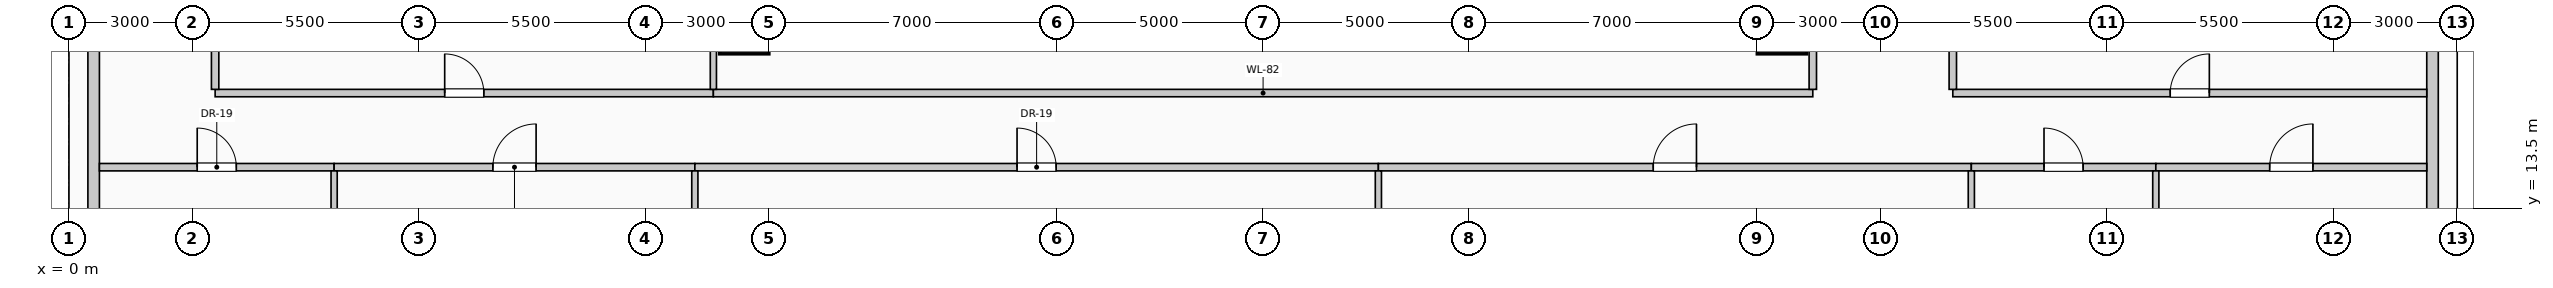
"""IFC4 building model, lengths in metres.
Left out: names, types, materials, properties, quantities, classifications, styles, units other than length and angle.
Written with IfcOpenShell. Run it as: python <this file> out.ifc"""

import sys

from ifc_helpers import new_model, si_unit, direction, frame, frame_2d, origin, origin_2d, place, context, subcontext, project, spatial, rectangle, extrude, element, fill, save


model = new_model("IFC4")
c1 = context("Model", 3, precision=1e-05, world=origin(), true_north=direction((0.0, 1.0)))
c2 = subcontext(c1, "Body", "Model", "MODEL_VIEW")
j1 = project(units=[si_unit("LENGTHUNIT", "METRE"), si_unit("PLANEANGLEUNIT", "RADIAN")], contexts=[c1])
p1 = place(None, origin())
s1 = spatial("IfcSite", under=j1, at=p1, CompositionType="ELEMENT")
p2 = place(p1, origin())
s2 = spatial("IfcBuilding", under=s1, at=p2, CompositionType="ELEMENT")
p3 = place(p2, frame((0.0, 0.0, 62.6)))
s3 = spatial("IfcBuildingStorey", under=s2, at=p3, CompositionType="ELEMENT", Elevation=62.6)
for number, where, z_axis, x_axis in (
    (1, (16.4, 18.0, 0.0), (0.0, 0.0, 1.0), (1.0, 0.0, 0.0)),
    (2, (41.6, 18.0, 0.0), (0.0, 0.0, 1.0), (1.0, 0.0, 0.0)),
):
    element("IfcColumn", number, at=place(p3, frame(where, z_axis=z_axis, x_axis=x_axis)), inside=s3, PredefinedType="COLUMN", context=c2, shape_type="SweptSolid", body=[
        extrude(rectangle(XDim=1.2, YDim=1.5, at=origin_2d()), origin(), (0.0, 0.0, 1.0), 4.0),
    ])
p4 = place(p3, frame((0.6, 10.47, 0.0), z_axis=(0.0, 0.0, 1.0), x_axis=(0.0, 1.0, 0.0)))
e3 = element("IfcWall", 3, at=p4, inside=s3, PredefinedType="SOLIDWALL", context=c2, shape_type="SweptSolid", body=[
    extrude(rectangle(XDim=7.06, YDim=0.28, at=frame_2d((3.53, 0.0))), origin(), (0.0, 0.0, 1.0), 2.85),
])
p5 = place(p4, frame((1.22, 0.0, 0.5)))
e4 = element("IfcOpeningElement", 4, at=p5, cuts=e3, PredefinedType="OPENING", context=c2, shape_type="SweptSolid", body=[
    extrude(rectangle(XDim=1.7, YDim=1.95, at=frame_2d((0.85, 0.975))), frame((0.0, 0.15, 0.0), z_axis=(0.0, -1.0, 0.0), x_axis=(1.0, 0.0, 0.0)), (0.0, 0.0, 1.0), 0.3),
])
p6 = place(p3, frame((57.4, 17.53, 0.0), z_axis=(0.0, 0.0, 1.0), x_axis=(0.0, -1.0, 0.0)))
e5 = element("IfcWall", 5, at=p6, inside=s3, PredefinedType="SOLIDWALL", context=c2, shape_type="SweptSolid", body=[
    extrude(rectangle(XDim=7.06, YDim=0.28, at=frame_2d((3.53, 0.0))), origin(), (0.0, 0.0, 1.0), 2.85),
])
p7 = place(p6, frame((4.14, 0.0, 0.5)))
e6 = element("IfcOpeningElement", 6, at=p7, cuts=e5, PredefinedType="OPENING", context=c2, shape_type="SweptSolid", body=[
    extrude(rectangle(XDim=1.7, YDim=1.95, at=frame_2d((0.85, 0.975))), frame((0.0, 0.15, 0.0), z_axis=(0.0, -1.0, 0.0), x_axis=(1.0, 0.0, 0.0)), (0.0, 0.0, 1.0), 0.3),
])
p8 = place(p3, frame((0.74, 14.5, 0.0), z_axis=(0.0, 0.0, 1.0), x_axis=(1.0, 0.0, 0.0)))
e7 = element("IfcWall", 7, at=p8, inside=s3, PredefinedType="PARTITIONING", context=c2, shape_type="SweptSolid", body=[
    extrude(rectangle(XDim=5.7, YDim=0.18, at=frame_2d((2.85, 0.0))), origin(), (0.0, 0.0, 1.0), 3.7),
])
p9 = place(p8, frame((2.375, 0.0, 0.0)))
e8 = element("IfcOpeningElement", 8, at=p9, cuts=e7, PredefinedType="OPENING", context=c2, shape_type="SweptSolid", body=[
    extrude(rectangle(XDim=0.95, YDim=2.15, at=frame_2d((0.475, 1.075))), frame((0.0, 0.1, 0.0), z_axis=(0.0, -1.0, 0.0), x_axis=(1.0, 0.0, 0.0)), (0.0, 0.0, 1.0), 0.2),
])
p10 = place(p3, frame((6.44, 14.5, 0.0), z_axis=(0.0, 0.0, 1.0), x_axis=(1.0, 0.0, 0.0)))
e9 = element("IfcWall", 9, at=p10, inside=s3, PredefinedType="PARTITIONING", context=c2, shape_type="SweptSolid", body=[
    extrude(rectangle(XDim=8.76, YDim=0.18, at=frame_2d((4.38, 0.0))), origin(), (0.0, 0.0, 1.0), 3.7),
])
p11 = place(p10, frame((3.855, 0.0, 0.0)))
e10 = element("IfcOpeningElement", 10, at=p11, cuts=e9, PredefinedType="OPENING", context=c2, shape_type="SweptSolid", body=[
    extrude(rectangle(XDim=1.05, YDim=2.15, at=frame_2d((0.525, 1.075))), frame((0.0, 0.1, 0.0), z_axis=(0.0, -1.0, 0.0), x_axis=(1.0, 0.0, 0.0)), (0.0, 0.0, 1.0), 0.2),
])
p12 = place(p3, frame((15.2, 14.5, 0.0), z_axis=(0.0, 0.0, 1.0), x_axis=(1.0, 0.0, 0.0)))
e11 = element("IfcWall", 11, at=p12, inside=s3, PredefinedType="PARTITIONING", context=c2, shape_type="SweptSolid", body=[
    extrude(rectangle(XDim=16.6, YDim=0.18, at=frame_2d((8.3, 0.0))), origin(), (0.0, 0.0, 1.0), 3.7),
])
p13 = place(p12, frame((7.825, 0.0, 0.0)))
e12 = element("IfcOpeningElement", 12, at=p13, cuts=e11, PredefinedType="OPENING", context=c2, shape_type="SweptSolid", body=[
    extrude(rectangle(XDim=0.95, YDim=2.15, at=frame_2d((0.475, 1.075))), frame((0.0, 0.1, 0.0), z_axis=(0.0, -1.0, 0.0), x_axis=(1.0, 0.0, 0.0)), (0.0, 0.0, 1.0), 0.2),
])
p14 = place(p3, frame((31.8, 14.5, 0.0), z_axis=(0.0, 0.0, 1.0), x_axis=(1.0, 0.0, 0.0)))
e13 = element("IfcWall", 13, at=p14, inside=s3, PredefinedType="PARTITIONING", context=c2, shape_type="SweptSolid", body=[
    extrude(rectangle(XDim=14.4, YDim=0.18, at=frame_2d((7.2, 0.0))), origin(), (0.0, 0.0, 1.0), 3.7),
])
p15 = place(p14, frame((6.675, 0.0, 0.0)))
e14 = element("IfcOpeningElement", 14, at=p15, cuts=e13, PredefinedType="OPENING", context=c2, shape_type="SweptSolid", body=[
    extrude(rectangle(XDim=1.05, YDim=2.15, at=frame_2d((0.525, 1.075))), frame((0.0, 0.1, 0.0), z_axis=(0.0, -1.0, 0.0), x_axis=(1.0, 0.0, 0.0)), (0.0, 0.0, 1.0), 0.2),
])
p16 = place(p3, frame((46.2, 14.5, 0.0), z_axis=(0.0, 0.0, 1.0), x_axis=(1.0, 0.0, 0.0)))
e15 = element("IfcWall", 15, at=p16, inside=s3, PredefinedType="PARTITIONING", context=c2, shape_type="SweptSolid", body=[
    extrude(rectangle(XDim=4.48, YDim=0.18, at=frame_2d((2.24, 0.0))), origin(), (0.0, 0.0, 1.0), 3.7),
])
p17 = place(p16, frame((1.765, 0.0, 0.0)))
e16 = element("IfcOpeningElement", 16, at=p17, cuts=e15, PredefinedType="OPENING", context=c2, shape_type="SweptSolid", body=[
    extrude(rectangle(XDim=0.95, YDim=2.15, at=frame_2d((0.475, 1.075))), frame((0.0, 0.1, 0.0), z_axis=(0.0, -1.0, 0.0), x_axis=(1.0, 0.0, 0.0)), (0.0, 0.0, 1.0), 0.2),
])
p18 = place(p3, frame((50.68, 14.5, 0.0), z_axis=(0.0, 0.0, 1.0), x_axis=(1.0, 0.0, 0.0)))
e17 = element("IfcWall", 17, at=p18, inside=s3, PredefinedType="PARTITIONING", context=c2, shape_type="SweptSolid", body=[
    extrude(rectangle(XDim=6.58, YDim=0.18, at=frame_2d((3.29, 0.0))), origin(), (0.0, 0.0, 1.0), 3.7),
])
p19 = place(p18, frame((2.765, 0.0, 0.0)))
e18 = element("IfcOpeningElement", 18, at=p19, cuts=e17, PredefinedType="OPENING", context=c2, shape_type="SweptSolid", body=[
    extrude(rectangle(XDim=1.05, YDim=2.15, at=frame_2d((0.525, 1.075))), frame((0.0, 0.1, 0.0), z_axis=(0.0, -1.0, 0.0), x_axis=(1.0, 0.0, 0.0)), (0.0, 0.0, 1.0), 0.2),
])
p20 = place(p3, frame((3.55, 16.3, 0.0), z_axis=(0.0, 0.0, 1.0), x_axis=(1.0, 0.0, 0.0)))
e19 = element("IfcWall", 19, at=p20, inside=s3, PredefinedType="PARTITIONING", context=c2, shape_type="SweptSolid", body=[
    extrude(rectangle(XDim=12.1, YDim=0.18, at=frame_2d((6.05, 0.0))), origin(), (0.0, 0.0, 1.0), 3.7),
])
p21 = place(p20, frame((5.575, 0.0, 0.0)))
e20 = element("IfcOpeningElement", 20, at=p21, cuts=e19, PredefinedType="OPENING", context=c2, shape_type="SweptSolid", body=[
    extrude(rectangle(XDim=0.95, YDim=2.15, at=frame_2d((0.475, 1.075))), frame((0.0, 0.1, 0.0), z_axis=(0.0, -1.0, 0.0), x_axis=(1.0, 0.0, 0.0)), (0.0, 0.0, 1.0), 0.2),
])
p22 = place(p3, frame((15.65, 16.3, 0.0), z_axis=(0.0, 0.0, 1.0), x_axis=(1.0, 0.0, 0.0)))
e21 = element("IfcWall", 21, at=p22, inside=s3, PredefinedType="PARTITIONING", context=c2, shape_type="SweptSolid", body=[
    extrude(rectangle(XDim=26.7, YDim=0.18, at=frame_2d((13.35, 0.0))), origin(), (0.0, 0.0, 1.0), 3.7),
])
p23 = place(p3, frame((45.75, 16.3, 0.0), z_axis=(0.0, 0.0, 1.0), x_axis=(1.0, 0.0, 0.0)))
e22 = element("IfcWall", 22, at=p23, inside=s3, PredefinedType="PARTITIONING", context=c2, shape_type="SweptSolid", body=[
    extrude(rectangle(XDim=11.51, YDim=0.18, at=frame_2d((5.755, 0.0))), origin(), (0.0, 0.0, 1.0), 3.7),
])
p24 = place(p23, frame((5.28, 0.0, 0.0)))
e23 = element("IfcOpeningElement", 23, at=p24, cuts=e22, PredefinedType="OPENING", context=c2, shape_type="SweptSolid", body=[
    extrude(rectangle(XDim=0.95, YDim=2.15, at=frame_2d((0.475, 1.075))), frame((0.0, 0.1, 0.0), z_axis=(0.0, -1.0, 0.0), x_axis=(1.0, 0.0, 0.0)), (0.0, 0.0, 1.0), 0.2),
])
p25 = place(p3, frame((3.55, 16.39, 0.0), z_axis=(0.0, 0.0, 1.0), x_axis=(0.0, 1.0, 0.0)))
e24 = element("IfcWall", 24, at=p25, inside=s3, PredefinedType="PARTITIONING", context=c2, shape_type="SweptSolid", body=[
    extrude(rectangle(XDim=3.17, YDim=0.18, at=frame_2d((1.585, 0.0))), origin(), (0.0, 0.0, 1.0), 3.7),
])
for number, where, z_axis, x_axis in (
    (25, (6.44, 0.74, 0.0), (0.0, 0.0, 1.0), (0.0, 1.0, 0.0)),
    (26, (15.2, 0.74, 0.0), (0.0, 0.0, 1.0), (0.0, 1.0, 0.0)),
):
    element("IfcWall", number, at=place(p3, frame(where, z_axis=z_axis, x_axis=x_axis)), inside=s3, PredefinedType="PARTITIONING", context=c2, shape_type="SweptSolid", body=[
        extrude(rectangle(XDim=13.67, YDim=0.15, at=frame_2d((6.835, 0.0))), origin(), (0.0, 0.0, 1.0), 3.7),
    ])
p26 = place(p3, frame((15.65, 16.39, 0.0), z_axis=(0.0, 0.0, 1.0), x_axis=(0.0, 1.0, 0.0)))
e27 = element("IfcWall", 27, at=p26, inside=s3, PredefinedType="PARTITIONING", context=c2, shape_type="SweptSolid", body=[
    extrude(rectangle(XDim=3.17, YDim=0.15, at=frame_2d((1.585, 0.0))), origin(), (0.0, 0.0, 1.0), 3.7),
])
p27 = place(p3, frame((31.8, 0.74, 0.0), z_axis=(0.0, 0.0, 1.0), x_axis=(0.0, 1.0, 0.0)))
e28 = element("IfcWall", 28, at=p27, inside=s3, PredefinedType="PARTITIONING", context=c2, shape_type="SweptSolid", body=[
    extrude(rectangle(XDim=13.67, YDim=0.15, at=frame_2d((6.835, 0.0))), origin(), (0.0, 0.0, 1.0), 3.7),
])
for number, where, z_axis, x_axis in (
    (29, (42.35, 16.39, 0.0), (0.0, 0.0, 1.0), (0.0, 1.0, 0.0)),
    (30, (45.75, 16.39, 0.0), (0.0, 0.0, 1.0), (0.0, 1.0, 0.0)),
):
    element("IfcWall", number, at=place(p3, frame(where, z_axis=z_axis, x_axis=x_axis)), inside=s3, PredefinedType="PARTITIONING", context=c2, shape_type="SweptSolid", body=[
        extrude(rectangle(XDim=3.17, YDim=0.18, at=frame_2d((1.585, 0.0))), origin(), (0.0, 0.0, 1.0), 3.7),
    ])
for number, where, z_axis, x_axis in (
    (31, (46.2, 0.74, 0.0), (0.0, 0.0, 1.0), (0.0, 1.0, 0.0)),
    (32, (50.68, 0.74, 0.0), (0.0, 0.0, 1.0), (0.0, 1.0, 0.0)),
):
    element("IfcWall", number, at=place(p3, frame(where, z_axis=z_axis, x_axis=x_axis)), inside=s3, PredefinedType="PARTITIONING", context=c2, shape_type="SweptSolid", body=[
        extrude(rectangle(XDim=13.67, YDim=0.15, at=frame_2d((6.835, 0.0))), origin(), (0.0, 0.0, 1.0), 3.7),
    ])
p28 = place(p9, origin())
e33 = element("IfcDoor", 33, at=p28, inside=s3, OperationType="SINGLE_SWING_LEFT", PredefinedType="DOOR", context=c2, shape_type="SweptSolid", body=[
    extrude(rectangle(XDim=0.95, YDim=2.15, at=frame_2d((0.475, 1.075))), frame((0.0, 0.025, 0.0), z_axis=(0.0, -1.0, 0.0), x_axis=(1.0, 0.0, 0.0)), (0.0, 0.0, 1.0), 0.05),
])
fill(e8, e33)
p29 = place(p11, origin())
e34 = element("IfcDoor", 34, at=p29, inside=s3, OperationType="SINGLE_SWING_RIGHT", PredefinedType="DOOR", context=c2, shape_type="SweptSolid", body=[
    extrude(rectangle(XDim=1.05, YDim=2.15, at=frame_2d((0.525, 1.075))), frame((0.0, 0.025, 0.0), z_axis=(0.0, -1.0, 0.0), x_axis=(1.0, 0.0, 0.0)), (0.0, 0.0, 1.0), 0.05),
])
fill(e10, e34)
p30 = place(p13, origin())
e35 = element("IfcDoor", 35, at=p30, inside=s3, OperationType="SINGLE_SWING_LEFT", PredefinedType="DOOR", context=c2, shape_type="SweptSolid", body=[
    extrude(rectangle(XDim=0.95, YDim=2.15, at=frame_2d((0.475, 1.075))), frame((0.0, 0.025, 0.0), z_axis=(0.0, -1.0, 0.0), x_axis=(1.0, 0.0, 0.0)), (0.0, 0.0, 1.0), 0.05),
])
fill(e12, e35)
p31 = place(p15, origin())
e36 = element("IfcDoor", 36, at=p31, inside=s3, OperationType="SINGLE_SWING_RIGHT", PredefinedType="DOOR", context=c2, shape_type="SweptSolid", body=[
    extrude(rectangle(XDim=1.05, YDim=2.15, at=frame_2d((0.525, 1.075))), frame((0.0, 0.025, 0.0), z_axis=(0.0, -1.0, 0.0), x_axis=(1.0, 0.0, 0.0)), (0.0, 0.0, 1.0), 0.05),
])
fill(e14, e36)
p32 = place(p17, origin())
e37 = element("IfcDoor", 37, at=p32, inside=s3, OperationType="SINGLE_SWING_LEFT", PredefinedType="DOOR", context=c2, shape_type="SweptSolid", body=[
    extrude(rectangle(XDim=0.95, YDim=2.15, at=frame_2d((0.475, 1.075))), frame((0.0, 0.025, 0.0), z_axis=(0.0, -1.0, 0.0), x_axis=(1.0, 0.0, 0.0)), (0.0, 0.0, 1.0), 0.05),
])
fill(e16, e37)
p33 = place(p19, origin())
e38 = element("IfcDoor", 38, at=p33, inside=s3, OperationType="SINGLE_SWING_RIGHT", PredefinedType="DOOR", context=c2, shape_type="SweptSolid", body=[
    extrude(rectangle(XDim=1.05, YDim=2.15, at=frame_2d((0.525, 1.075))), frame((0.0, 0.025, 0.0), z_axis=(0.0, -1.0, 0.0), x_axis=(1.0, 0.0, 0.0)), (0.0, 0.0, 1.0), 0.05),
])
fill(e18, e38)
p34 = place(p21, origin())
e39 = element("IfcDoor", 39, at=p34, inside=s3, OperationType="SINGLE_SWING_LEFT", PredefinedType="DOOR", context=c2, shape_type="SweptSolid", body=[
    extrude(rectangle(XDim=0.95, YDim=2.15, at=frame_2d((0.475, 1.075))), frame((0.0, 0.025, 0.0), z_axis=(0.0, -1.0, 0.0), x_axis=(1.0, 0.0, 0.0)), (0.0, 0.0, 1.0), 0.05),
])
fill(e20, e39)
p35 = place(p24, origin())
e40 = element("IfcDoor", 40, at=p35, inside=s3, OperationType="SINGLE_SWING_RIGHT", PredefinedType="DOOR", context=c2, shape_type="SweptSolid", body=[
    extrude(rectangle(XDim=0.95, YDim=2.15, at=frame_2d((0.475, 1.075))), frame((0.0, 0.025, 0.0), z_axis=(0.0, -1.0, 0.0), x_axis=(1.0, 0.0, 0.0)), (0.0, 0.0, 1.0), 0.05),
])
fill(e23, e40)
save(model, sys.argv[1])
